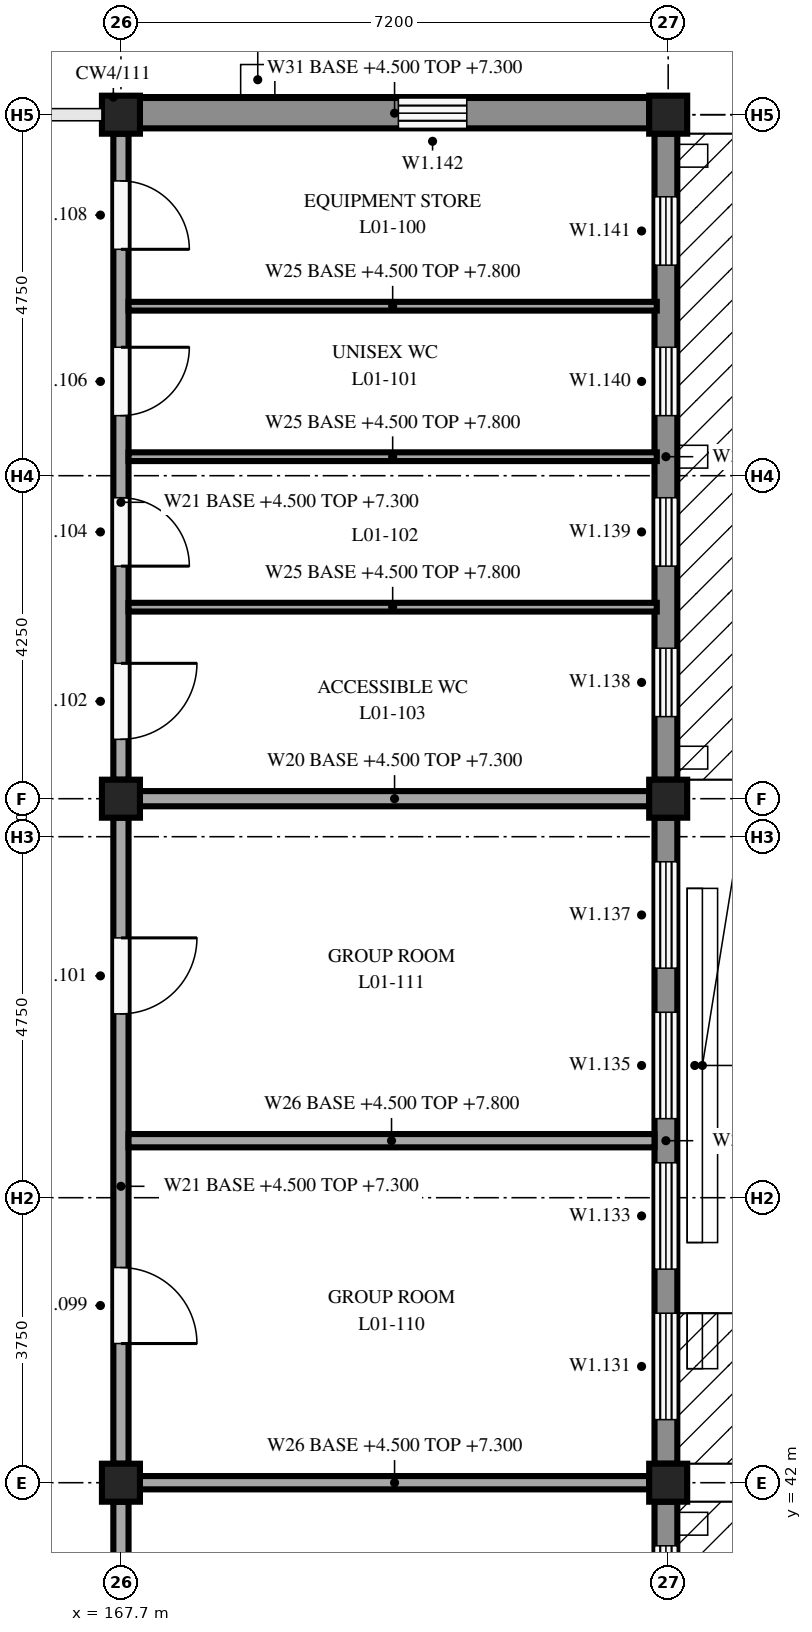
"""IFC4 building model, lengths in metres.
Left out: names, types, materials, properties, quantities, classifications, styles, units other than length and angle.
Written with IfcOpenShell. Run it as: python <this file> out.ifc"""

import sys

from ifc_helpers import new_model, si_unit, direction, frame, frame_2d, origin, origin_2d, place, context, subcontext, project, spatial, rectangle, extrude, element, fill, save


model = new_model("IFC4")
c1 = context("Model", 3, precision=1e-05, world=origin(), true_north=direction((0.0, 1.0)))
c2 = subcontext(c1, "Body", "Model", "MODEL_VIEW")
j1 = project(units=[si_unit("LENGTHUNIT", "METRE"), si_unit("PLANEANGLEUNIT", "RADIAN")], contexts=[c1])
p1 = place(None, origin())
s1 = spatial("IfcSite", under=j1, at=p1, CompositionType="ELEMENT")
p2 = place(p1, origin())
s2 = spatial("IfcBuilding", under=s1, at=p2, CompositionType="ELEMENT")
p3 = place(p2, frame((0.0, 0.0, 4.5)))
s3 = spatial("IfcBuildingStorey", under=s2, at=p3, CompositionType="ELEMENT", Elevation=4.5)
for number, where, z_axis, x_axis in (
    (1, (167.7, 42.0, 0.0), (0.0, 0.0, 1.0), (1.0, 0.0, 0.0)),
    (2, (167.7, 51.0, 0.0), (0.0, 0.0, 1.0), (1.0, 0.0, 0.0)),
    (3, (167.7, 60.0, 0.0), (0.0, 0.0, 1.0), (1.0, 0.0, 0.0)),
    (4, (174.9, 42.0, 0.0), (0.0, 0.0, 1.0), (1.0, 0.0, 0.0)),
    (5, (174.9, 51.0, 0.0), (0.0, 0.0, 1.0), (1.0, 0.0, 0.0)),
    (6, (174.9, 60.0, 0.0), (0.0, 0.0, 1.0), (1.0, 0.0, 0.0)),
):
    element("IfcColumn", number, at=place(p3, frame(where, z_axis=z_axis, x_axis=x_axis)), inside=s3, PredefinedType="COLUMN", context=c2, shape_type="SweptSolid", body=[
        extrude(rectangle(XDim=0.5, YDim=0.5, at=origin_2d()), origin(), (0.0, 0.0, 1.0), 3.3),
    ])
p4 = place(p3, frame((174.87, 41.75, 0.0), z_axis=(0.0, 0.0, 1.0), x_axis=(0.0, -1.0, 0.0)))
e7 = element("IfcWall", 7, at=p4, inside=s3, PredefinedType="STANDARD", context=c2, shape_type="SweptSolid", body=[
    extrude(rectangle(XDim=8.5, YDim=0.3, at=frame_2d((4.25, 0.0))), origin(), (0.0, 0.0, 1.0), 2.75),
])
p5 = place(p4, frame((6.52, 0.0, 0.3)))
e8 = element("IfcOpeningElement", 8, at=p5, cuts=e7, PredefinedType="OPENING", context=c2, shape_type="SweptSolid", body=[
    extrude(rectangle(XDim=1.4, YDim=2.4, at=frame_2d((0.7, 1.2))), frame((0.0, 0.16, 0.0), z_axis=(0.0, -1.0, 0.0), x_axis=(1.0, 0.0, 0.0)), (0.0, 0.0, 1.0), 0.32),
])
p6 = place(p4, frame((4.54, 0.0, 0.3)))
e9 = element("IfcOpeningElement", 9, at=p6, cuts=e7, PredefinedType="OPENING", context=c2, shape_type="SweptSolid", body=[
    extrude(rectangle(XDim=1.4, YDim=2.4, at=frame_2d((0.7, 1.2))), frame((0.0, 0.16, 0.0), z_axis=(0.0, -1.0, 0.0), x_axis=(1.0, 0.0, 0.0)), (0.0, 0.0, 1.0), 0.32),
])
p7 = place(p4, frame((2.56, 0.0, 0.3)))
e10 = element("IfcOpeningElement", 10, at=p7, cuts=e7, PredefinedType="OPENING", context=c2, shape_type="SweptSolid", body=[
    extrude(rectangle(XDim=1.4, YDim=2.4, at=frame_2d((0.7, 1.2))), frame((0.0, 0.16, 0.0), z_axis=(0.0, -1.0, 0.0), x_axis=(1.0, 0.0, 0.0)), (0.0, 0.0, 1.0), 0.32),
])
p8 = place(p4, frame((0.58, 0.0, 0.3)))
e11 = element("IfcOpeningElement", 11, at=p8, cuts=e7, PredefinedType="OPENING", context=c2, shape_type="SweptSolid", body=[
    extrude(rectangle(XDim=1.4, YDim=2.4, at=frame_2d((0.7, 1.2))), frame((0.0, 0.16, 0.0), z_axis=(0.0, -1.0, 0.0), x_axis=(1.0, 0.0, 0.0)), (0.0, 0.0, 1.0), 0.32),
])
p9 = place(p3, frame((174.87, 50.75, 0.0), z_axis=(0.0, 0.0, 1.0), x_axis=(0.0, -1.0, 0.0)))
e12 = element("IfcWall", 12, at=p9, inside=s3, PredefinedType="STANDARD", context=c2, shape_type="SweptSolid", body=[
    extrude(rectangle(XDim=8.5, YDim=0.3, at=frame_2d((4.25, 0.0))), origin(), (0.0, 0.0, 1.0), 2.75),
])
p10 = place(p9, frame((6.52, 0.0, 0.6)))
e13 = element("IfcOpeningElement", 13, at=p10, cuts=e12, PredefinedType="OPENING", context=c2, shape_type="SweptSolid", body=[
    extrude(rectangle(XDim=1.4, YDim=2.1, at=frame_2d((0.7, 1.05))), frame((0.0, 0.16, 0.0), z_axis=(0.0, -1.0, 0.0), x_axis=(1.0, 0.0, 0.0)), (0.0, 0.0, 1.0), 0.32),
])
p11 = place(p9, frame((4.54, 0.0, 0.6)))
e14 = element("IfcOpeningElement", 14, at=p11, cuts=e12, PredefinedType="OPENING", context=c2, shape_type="SweptSolid", body=[
    extrude(rectangle(XDim=1.4, YDim=2.1, at=frame_2d((0.7, 1.05))), frame((0.0, 0.16, 0.0), z_axis=(0.0, -1.0, 0.0), x_axis=(1.0, 0.0, 0.0)), (0.0, 0.0, 1.0), 0.32),
])
p12 = place(p9, frame((2.56, 0.0, 0.6)))
e15 = element("IfcOpeningElement", 15, at=p12, cuts=e12, PredefinedType="OPENING", context=c2, shape_type="SweptSolid", body=[
    extrude(rectangle(XDim=1.4, YDim=2.1, at=frame_2d((0.7, 1.05))), frame((0.0, 0.16, 0.0), z_axis=(0.0, -1.0, 0.0), x_axis=(1.0, 0.0, 0.0)), (0.0, 0.0, 1.0), 0.32),
])
p13 = place(p9, frame((0.58, 0.0, 0.6)))
e16 = element("IfcOpeningElement", 16, at=p13, cuts=e12, PredefinedType="OPENING", context=c2, shape_type="SweptSolid", body=[
    extrude(rectangle(XDim=1.4, YDim=2.1, at=frame_2d((0.7, 1.05))), frame((0.0, 0.16, 0.0), z_axis=(0.0, -1.0, 0.0), x_axis=(1.0, 0.0, 0.0)), (0.0, 0.0, 1.0), 0.32),
])
p14 = place(p3, frame((174.87, 59.75, 0.0), z_axis=(0.0, 0.0, 1.0), x_axis=(0.0, -1.0, 0.0)))
e17 = element("IfcWall", 17, at=p14, inside=s3, PredefinedType="STANDARD", context=c2, shape_type="SweptSolid", body=[
    extrude(rectangle(XDim=8.5, YDim=0.3, at=frame_2d((4.25, 0.0))), origin(), (0.0, 0.0, 1.0), 2.75),
])
p15 = place(p14, frame((6.77, 0.0, 1.6)))
e18 = element("IfcOpeningElement", 18, at=p15, cuts=e17, PredefinedType="OPENING", context=c2, shape_type="SweptSolid", body=[
    extrude(rectangle(XDim=0.9, YDim=1.0, at=frame_2d((0.45, 0.5))), frame((0.0, 0.16, 0.0), z_axis=(0.0, -1.0, 0.0), x_axis=(1.0, 0.0, 0.0)), (0.0, 0.0, 1.0), 0.32),
])
p16 = place(p14, frame((4.79, 0.0, 1.6)))
e19 = element("IfcOpeningElement", 19, at=p16, cuts=e17, PredefinedType="OPENING", context=c2, shape_type="SweptSolid", body=[
    extrude(rectangle(XDim=0.9, YDim=1.0, at=frame_2d((0.45, 0.5))), frame((0.0, 0.16, 0.0), z_axis=(0.0, -1.0, 0.0), x_axis=(1.0, 0.0, 0.0)), (0.0, 0.0, 1.0), 0.32),
])
p17 = place(p14, frame((2.81, 0.0, 1.6)))
e20 = element("IfcOpeningElement", 20, at=p17, cuts=e17, PredefinedType="OPENING", context=c2, shape_type="SweptSolid", body=[
    extrude(rectangle(XDim=0.9, YDim=1.0, at=frame_2d((0.45, 0.5))), frame((0.0, 0.16, 0.0), z_axis=(0.0, -1.0, 0.0), x_axis=(1.0, 0.0, 0.0)), (0.0, 0.0, 1.0), 0.32),
])
p18 = place(p14, frame((0.83, 0.0, 1.6)))
e21 = element("IfcOpeningElement", 21, at=p18, cuts=e17, PredefinedType="OPENING", context=c2, shape_type="SweptSolid", body=[
    extrude(rectangle(XDim=0.9, YDim=1.0, at=frame_2d((0.45, 0.5))), frame((0.0, 0.16, 0.0), z_axis=(0.0, -1.0, 0.0), x_axis=(1.0, 0.0, 0.0)), (0.0, 0.0, 1.0), 0.32),
])
p19 = place(p3, frame((167.95, 60.02, 0.0), z_axis=(0.0, 0.0, 1.0), x_axis=(1.0, 0.0, 0.0)))
e22 = element("IfcWall", 22, at=p19, inside=s3, PredefinedType="STANDARD", context=c2, shape_type="SweptSolid", body=[
    extrude(rectangle(XDim=6.7, YDim=0.4, at=frame_2d((3.35, 0.0))), origin(), (0.0, 0.0, 1.0), 2.8),
])
p20 = place(p19, frame((3.4, 0.0, 1.6)))
e23 = element("IfcOpeningElement", 23, at=p20, cuts=e22, PredefinedType="OPENING", context=c2, shape_type="SweptSolid", body=[
    extrude(rectangle(XDim=0.9, YDim=1.0, at=frame_2d((0.45, 0.5))), frame((0.0, 0.21, 0.0), z_axis=(0.0, -1.0, 0.0), x_axis=(1.0, 0.0, 0.0)), (0.0, 0.0, 1.0), 0.42),
])
p21 = place(p3, frame((167.7, 59.75, 0.0), z_axis=(0.0, 0.0, 1.0), x_axis=(0.0, -1.0, 0.0)))
e24 = element("IfcWall", 24, at=p21, inside=s3, PredefinedType="PARTITIONING", context=c2, shape_type="SweptSolid", body=[
    extrude(rectangle(XDim=8.5, YDim=0.2, at=frame_2d((4.25, 0.0))), origin(), (0.0, 0.0, 1.0), 2.8),
])
p22 = place(p21, frame((6.969, 0.0, 0.0)))
e25 = element("IfcOpeningElement", 25, at=p22, cuts=e24, PredefinedType="OPENING", context=c2, shape_type="SweptSolid", body=[
    extrude(rectangle(XDim=1.0, YDim=2.1, at=frame_2d((0.5, 1.05))), frame((0.0, 0.11, 0.0), z_axis=(0.0, -1.0, 0.0), x_axis=(1.0, 0.0, 0.0)), (0.0, 0.0, 1.0), 0.22),
])
p23 = place(p21, frame((4.79, 0.0, 0.0)))
e26 = element("IfcOpeningElement", 26, at=p23, cuts=e24, PredefinedType="OPENING", context=c2, shape_type="SweptSolid", body=[
    extrude(rectangle(XDim=0.9, YDim=2.1, at=frame_2d((0.45, 1.05))), frame((0.0, 0.11, 0.0), z_axis=(0.0, -1.0, 0.0), x_axis=(1.0, 0.0, 0.0)), (0.0, 0.0, 1.0), 0.22),
])
p24 = place(p21, frame((2.81, 0.0, 0.0)))
e27 = element("IfcOpeningElement", 27, at=p24, cuts=e24, PredefinedType="OPENING", context=c2, shape_type="SweptSolid", body=[
    extrude(rectangle(XDim=0.9, YDim=2.1, at=frame_2d((0.45, 1.05))), frame((0.0, 0.11, 0.0), z_axis=(0.0, -1.0, 0.0), x_axis=(1.0, 0.0, 0.0)), (0.0, 0.0, 1.0), 0.22),
])
p25 = place(p21, frame((0.621, 0.0, 0.0)))
e28 = element("IfcOpeningElement", 28, at=p25, cuts=e24, PredefinedType="OPENING", context=c2, shape_type="SweptSolid", body=[
    extrude(rectangle(XDim=0.9, YDim=2.1, at=frame_2d((0.45, 1.05))), frame((0.0, 0.11, 0.0), z_axis=(0.0, -1.0, 0.0), x_axis=(1.0, 0.0, 0.0)), (0.0, 0.0, 1.0), 0.22),
])
p26 = place(p3, frame((167.95, 51.0, 0.0), z_axis=(0.0, 0.0, 1.0), x_axis=(1.0, 0.0, 0.0)))
e29 = element("IfcWall", 29, at=p26, inside=s3, PredefinedType="PARTITIONING", context=c2, shape_type="SweptSolid", body=[
    extrude(rectangle(XDim=6.7, YDim=0.2, at=frame_2d((3.35, 0.0))), origin(), (0.0, 0.0, 1.0), 2.8),
])
for number, where, z_axis, x_axis in (
    (30, (167.8, 57.48, 0.0), (0.0, 0.0, 1.0), (1.0, 0.0, 0.0)),
    (31, (167.8, 55.5, 0.0), (0.0, 0.0, 1.0), (1.0, 0.0, 0.0)),
    (32, (167.8, 53.52, 0.0), (0.0, 0.0, 1.0), (1.0, 0.0, 0.0)),
):
    element("IfcWall", number, at=place(p3, frame(where, z_axis=z_axis, x_axis=x_axis)), inside=s3, PredefinedType="PARTITIONING", context=c2, shape_type="SweptSolid", body=[
        extrude(rectangle(XDim=6.95, YDim=0.115, at=frame_2d((3.475, 0.0))), origin(), (0.0, 0.0, 1.0), 3.3),
    ])
p27 = place(p3, frame((167.7, 41.75, 0.0), z_axis=(0.0, 0.0, 1.0), x_axis=(0.0, -1.0, 0.0)))
e33 = element("IfcWall", 33, at=p27, inside=s3, PredefinedType="PARTITIONING", context=c2, shape_type="SweptSolid", body=[
    extrude(rectangle(XDim=8.5, YDim=0.2, at=frame_2d((4.25, 0.0))), origin(), (0.0, 0.0, 1.0), 2.8),
])
p28 = place(p27, frame((3.5, 0.0, 0.0)))
e34 = element("IfcOpeningElement", 34, at=p28, cuts=e33, PredefinedType="OPENING", context=c2, shape_type="SweptSolid", body=[
    extrude(rectangle(XDim=1.5, YDim=2.1, at=frame_2d((0.75, 1.05))), frame((0.0, 0.11, 0.0), z_axis=(0.0, -1.0, 0.0), x_axis=(1.0, 0.0, 0.0)), (0.0, 0.0, 1.0), 0.22),
])
p29 = place(p3, frame((167.7, 50.75, 0.0), z_axis=(0.0, 0.0, 1.0), x_axis=(0.0, -1.0, 0.0)))
e35 = element("IfcWall", 35, at=p29, inside=s3, PredefinedType="PARTITIONING", context=c2, shape_type="SweptSolid", body=[
    extrude(rectangle(XDim=8.5, YDim=0.2, at=frame_2d((4.25, 0.0))), origin(), (0.0, 0.0, 1.0), 2.8),
])
p30 = place(p29, frame((5.919, 0.0, 0.0)))
e36 = element("IfcOpeningElement", 36, at=p30, cuts=e35, PredefinedType="OPENING", context=c2, shape_type="SweptSolid", body=[
    extrude(rectangle(XDim=1.0, YDim=2.1, at=frame_2d((0.5, 1.05))), frame((0.0, 0.11, 0.0), z_axis=(0.0, -1.0, 0.0), x_axis=(1.0, 0.0, 0.0)), (0.0, 0.0, 1.0), 0.22),
])
p31 = place(p29, frame((1.581, 0.0, 0.0)))
e37 = element("IfcOpeningElement", 37, at=p31, cuts=e35, PredefinedType="OPENING", context=c2, shape_type="SweptSolid", body=[
    extrude(rectangle(XDim=1.0, YDim=2.1, at=frame_2d((0.5, 1.05))), frame((0.0, 0.11, 0.0), z_axis=(0.0, -1.0, 0.0), x_axis=(1.0, 0.0, 0.0)), (0.0, 0.0, 1.0), 0.22),
])
p32 = place(p3, frame((167.95, 42.0, 0.0), z_axis=(0.0, 0.0, 1.0), x_axis=(1.0, 0.0, 0.0)))
e38 = element("IfcWall", 38, at=p32, inside=s3, PredefinedType="PARTITIONING", context=c2, shape_type="SweptSolid", body=[
    extrude(rectangle(XDim=6.7, YDim=0.175, at=frame_2d((3.35, 0.0))), origin(), (0.0, 0.0, 1.0), 2.8),
])
p33 = place(p3, frame((167.8, 46.5, 0.0), z_axis=(0.0, 0.0, 1.0), x_axis=(1.0, 0.0, 0.0)))
e39 = element("IfcWall", 39, at=p33, inside=s3, PredefinedType="PARTITIONING", context=c2, shape_type="SweptSolid", body=[
    extrude(rectangle(XDim=6.92, YDim=0.175, at=frame_2d((3.46, 0.0))), origin(), (0.0, 0.0, 1.0), 3.3),
])
p34 = place(p8, origin())
e40 = element("IfcWindow", 40, at=p34, inside=s3, PartitioningType="DOUBLE_PANEL_VERTICAL", PredefinedType="WINDOW", context=c2, shape_type="SweptSolid", body=[
    extrude(rectangle(XDim=1.4, YDim=2.4, at=frame_2d((0.7, 1.2))), frame((0.0, 0.03, 0.0), z_axis=(0.0, -1.0, 0.0), x_axis=(1.0, 0.0, 0.0)), (0.0, 0.0, 1.0), 0.06),
])
fill(e11, e40)
p35 = place(p10, origin())
e41 = element("IfcWindow", 41, at=p35, inside=s3, PartitioningType="DOUBLE_PANEL_VERTICAL", PredefinedType="WINDOW", context=c2, shape_type="SweptSolid", body=[
    extrude(rectangle(XDim=1.4, YDim=2.1, at=frame_2d((0.7, 1.05))), frame((0.0, 0.03, 0.0), z_axis=(0.0, -1.0, 0.0), x_axis=(1.0, 0.0, 0.0)), (0.0, 0.0, 1.0), 0.06),
])
fill(e13, e41)
p36 = place(p11, origin())
e42 = element("IfcWindow", 42, at=p36, inside=s3, PartitioningType="DOUBLE_PANEL_VERTICAL", PredefinedType="WINDOW", context=c2, shape_type="SweptSolid", body=[
    extrude(rectangle(XDim=1.4, YDim=2.1, at=frame_2d((0.7, 1.05))), frame((0.0, 0.03, 0.0), z_axis=(0.0, -1.0, 0.0), x_axis=(1.0, 0.0, 0.0)), (0.0, 0.0, 1.0), 0.06),
])
fill(e14, e42)
p37 = place(p12, origin())
e43 = element("IfcWindow", 43, at=p37, inside=s3, PartitioningType="DOUBLE_PANEL_VERTICAL", PredefinedType="WINDOW", context=c2, shape_type="SweptSolid", body=[
    extrude(rectangle(XDim=1.4, YDim=2.1, at=frame_2d((0.7, 1.05))), frame((0.0, 0.03, 0.0), z_axis=(0.0, -1.0, 0.0), x_axis=(1.0, 0.0, 0.0)), (0.0, 0.0, 1.0), 0.06),
])
fill(e15, e43)
p38 = place(p13, origin())
e44 = element("IfcWindow", 44, at=p38, inside=s3, PartitioningType="DOUBLE_PANEL_VERTICAL", PredefinedType="WINDOW", context=c2, shape_type="SweptSolid", body=[
    extrude(rectangle(XDim=1.4, YDim=2.1, at=frame_2d((0.7, 1.05))), frame((0.0, 0.03, 0.0), z_axis=(0.0, -1.0, 0.0), x_axis=(1.0, 0.0, 0.0)), (0.0, 0.0, 1.0), 0.06),
])
fill(e16, e44)
p39 = place(p15, origin())
e45 = element("IfcWindow", 45, at=p39, inside=s3, PartitioningType="SINGLE_PANEL", PredefinedType="WINDOW", context=c2, shape_type="SweptSolid", body=[
    extrude(rectangle(XDim=0.9, YDim=1.0, at=frame_2d((0.45, 0.5))), frame((0.0, 0.03, 0.0), z_axis=(0.0, -1.0, 0.0), x_axis=(1.0, 0.0, 0.0)), (0.0, 0.0, 1.0), 0.06),
])
fill(e18, e45)
p40 = place(p16, origin())
e46 = element("IfcWindow", 46, at=p40, inside=s3, PartitioningType="SINGLE_PANEL", PredefinedType="WINDOW", context=c2, shape_type="SweptSolid", body=[
    extrude(rectangle(XDim=0.9, YDim=1.0, at=frame_2d((0.45, 0.5))), frame((0.0, 0.03, 0.0), z_axis=(0.0, -1.0, 0.0), x_axis=(1.0, 0.0, 0.0)), (0.0, 0.0, 1.0), 0.06),
])
fill(e19, e46)
p41 = place(p17, origin())
e47 = element("IfcWindow", 47, at=p41, inside=s3, PartitioningType="SINGLE_PANEL", PredefinedType="WINDOW", context=c2, shape_type="SweptSolid", body=[
    extrude(rectangle(XDim=0.9, YDim=1.0, at=frame_2d((0.45, 0.5))), frame((0.0, 0.03, 0.0), z_axis=(0.0, -1.0, 0.0), x_axis=(1.0, 0.0, 0.0)), (0.0, 0.0, 1.0), 0.06),
])
fill(e20, e47)
p42 = place(p18, origin())
e48 = element("IfcWindow", 48, at=p42, inside=s3, PartitioningType="SINGLE_PANEL", PredefinedType="WINDOW", context=c2, shape_type="SweptSolid", body=[
    extrude(rectangle(XDim=0.9, YDim=1.0, at=frame_2d((0.45, 0.5))), frame((0.0, 0.03, 0.0), z_axis=(0.0, -1.0, 0.0), x_axis=(1.0, 0.0, 0.0)), (0.0, 0.0, 1.0), 0.06),
])
fill(e21, e48)
p43 = place(p20, origin())
e49 = element("IfcWindow", 49, at=p43, inside=s3, PartitioningType="SINGLE_PANEL", PredefinedType="WINDOW", context=c2, shape_type="SweptSolid", body=[
    extrude(rectangle(XDim=0.9, YDim=1.0, at=frame_2d((0.45, 0.5))), frame((0.0, 0.03, 0.0), z_axis=(0.0, -1.0, 0.0), x_axis=(1.0, 0.0, 0.0)), (0.0, 0.0, 1.0), 0.06),
])
fill(e23, e49)
p44 = place(p22, origin())
e50 = element("IfcDoor", 50, at=p44, inside=s3, OperationType="SINGLE_SWING_LEFT", PredefinedType="DOOR", context=c2, shape_type="SweptSolid", body=[
    extrude(rectangle(XDim=1.0, YDim=2.1, at=frame_2d((0.5, 1.05))), frame((0.0, 0.025, 0.0), z_axis=(0.0, -1.0, 0.0), x_axis=(1.0, 0.0, 0.0)), (0.0, 0.0, 1.0), 0.05),
])
fill(e25, e50)
p45 = place(p23, origin())
e51 = element("IfcDoor", 51, at=p45, inside=s3, OperationType="SINGLE_SWING_RIGHT", PredefinedType="DOOR", context=c2, shape_type="SweptSolid", body=[
    extrude(rectangle(XDim=0.9, YDim=2.1, at=frame_2d((0.45, 1.05))), frame((0.0, 0.025, 0.0), z_axis=(0.0, -1.0, 0.0), x_axis=(1.0, 0.0, 0.0)), (0.0, 0.0, 1.0), 0.05),
])
fill(e26, e51)
p46 = place(p24, origin())
e52 = element("IfcDoor", 52, at=p46, inside=s3, OperationType="SINGLE_SWING_LEFT", PredefinedType="DOOR", context=c2, shape_type="SweptSolid", body=[
    extrude(rectangle(XDim=0.9, YDim=2.1, at=frame_2d((0.45, 1.05))), frame((0.0, 0.025, 0.0), z_axis=(0.0, -1.0, 0.0), x_axis=(1.0, 0.0, 0.0)), (0.0, 0.0, 1.0), 0.05),
])
fill(e27, e52)
p47 = place(p25, origin())
e53 = element("IfcDoor", 53, at=p47, inside=s3, OperationType="SINGLE_SWING_RIGHT", PredefinedType="DOOR", context=c2, shape_type="SweptSolid", body=[
    extrude(rectangle(XDim=0.9, YDim=2.1, at=frame_2d((0.45, 1.05))), frame((0.0, 0.025, 0.0), z_axis=(0.0, -1.0, 0.0), x_axis=(1.0, 0.0, 0.0)), (0.0, 0.0, 1.0), 0.05),
])
fill(e28, e53)
p48 = place(p30, origin())
e54 = element("IfcDoor", 54, at=p48, inside=s3, OperationType="SINGLE_SWING_RIGHT", PredefinedType="DOOR", context=c2, shape_type="SweptSolid", body=[
    extrude(rectangle(XDim=1.0, YDim=2.1, at=frame_2d((0.5, 1.05))), frame((0.0, 0.025, 0.0), z_axis=(0.0, -1.0, 0.0), x_axis=(1.0, 0.0, 0.0)), (0.0, 0.0, 1.0), 0.05),
])
fill(e36, e54)
p49 = place(p31, origin())
e55 = element("IfcDoor", 55, at=p49, inside=s3, OperationType="SINGLE_SWING_LEFT", PredefinedType="DOOR", context=c2, shape_type="SweptSolid", body=[
    extrude(rectangle(XDim=1.0, YDim=2.1, at=frame_2d((0.5, 1.05))), frame((0.0, 0.025, 0.0), z_axis=(0.0, -1.0, 0.0), x_axis=(1.0, 0.0, 0.0)), (0.0, 0.0, 1.0), 0.05),
])
fill(e37, e55)
save(model, sys.argv[1])
